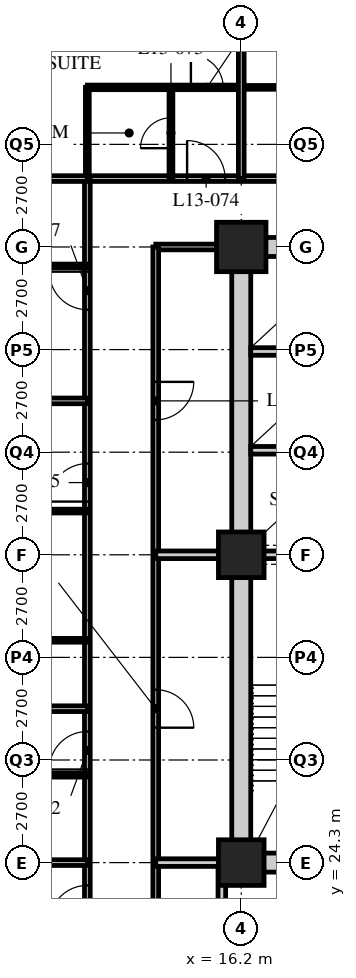
"""IFC4 building model, lengths in metres.
Left out: names, types, materials, properties, quantities, classifications, styles, units other than length and angle.
Written with IfcOpenShell. Run it as: python <this file> out.ifc"""

import sys

from ifc_helpers import new_model, si_unit, direction, frame, frame_2d, origin, origin_2d, place, context, subcontext, project, spatial, rectangle, hollow_rectangle, extrude, element, fill, save


model = new_model("IFC4")
c1 = context("Model", 3, precision=1e-05, world=origin(), true_north=direction((0.0, 1.0)))
c2 = subcontext(c1, "Body", "Model", "MODEL_VIEW")
j1 = project(units=[si_unit("LENGTHUNIT", "METRE"), si_unit("PLANEANGLEUNIT", "RADIAN")], contexts=[c1])
p1 = place(None, origin())
s1 = spatial("IfcSite", under=j1, at=p1, CompositionType="ELEMENT")
p2 = place(p1, origin())
s2 = spatial("IfcBuilding", under=s1, at=p2, CompositionType="ELEMENT")
p3 = place(p2, frame((0.0, 0.0, 56.8)))
s3 = spatial("IfcBuildingStorey", under=s2, at=p3, CompositionType="ELEMENT", Elevation=56.8)
for number, where, z_axis, x_axis in (
    (1, (16.2, 24.3, 0.0), (0.0, 0.0, 1.0), (1.0, 0.0, 0.0)),
    (2, (16.2, 32.4, 0.0), (0.0, 0.0, 1.0), (1.0, 0.0, 0.0)),
):
    element("IfcColumn", number, at=place(p3, frame(where, z_axis=z_axis, x_axis=x_axis)), inside=s3, PredefinedType="COLUMN", context=c2, shape_type="SweptSolid", body=[
        extrude(hollow_rectangle(XDim=1.2, YDim=1.2, WallThickness=0.12, at=origin_2d()), origin(), (0.0, 0.0, 1.0), 3.4),
    ])
p4 = place(p3, frame((16.2, 40.5, 0.0), z_axis=(0.0, 0.0, 1.0), x_axis=(1.0, 0.0, 0.0)))
e3 = element("IfcColumn", 3, at=p4, inside=s3, PredefinedType="COLUMN", context=c2, shape_type="SweptSolid", body=[
    extrude(hollow_rectangle(XDim=1.3, YDim=1.3, WallThickness=0.13, at=origin_2d()), origin(), (0.0, 0.0, 1.0), 3.4),
])
p5 = place(p3, frame((12.15, 42.3, 0.0), z_axis=(0.0, 0.0, 1.0), x_axis=(1.0, 0.0, 0.0)))
e4 = element("IfcWall", 4, at=p5, inside=s3, PredefinedType="PARTITIONING", context=c2, shape_type="SweptSolid", body=[
    extrude(rectangle(XDim=32.4, YDim=0.15, at=frame_2d((16.2, 0.0))), origin(), (0.0, 0.0, 1.0), 3.19),
])
p6 = place(p5, frame((6.5, 0.0, 0.0)))
e5 = element("IfcOpeningElement", 5, at=p6, cuts=e4, PredefinedType="OPENING", context=c2, shape_type="SweptSolid", body=[
    extrude(rectangle(XDim=1.0, YDim=2.1, at=frame_2d((0.5, 1.05))), frame((0.0, 0.085, 0.0), z_axis=(0.0, -1.0, 0.0), x_axis=(1.0, 0.0, 0.0)), (0.0, 0.0, 1.0), 0.17),
])
p7 = place(p5, frame((10.55, 0.0, 0.0)))
e6 = element("IfcOpeningElement", 6, at=p7, cuts=e4, PredefinedType="OPENING", context=c2, shape_type="SweptSolid", body=[
    extrude(rectangle(XDim=1.0, YDim=2.1, at=frame_2d((0.5, 1.05))), frame((0.0, 0.085, 0.0), z_axis=(0.0, -1.0, 0.0), x_axis=(1.0, 0.0, 0.0)), (0.0, 0.0, 1.0), 0.17),
])
p8 = place(p5, frame((14.6, 0.0, 0.0)))
e7 = element("IfcOpeningElement", 7, at=p8, cuts=e4, PredefinedType="OPENING", context=c2, shape_type="SweptSolid", body=[
    extrude(rectangle(XDim=1.0, YDim=2.1, at=frame_2d((0.5, 1.05))), frame((0.0, 0.085, 0.0), z_axis=(0.0, -1.0, 0.0), x_axis=(1.0, 0.0, 0.0)), (0.0, 0.0, 1.0), 0.17),
])
p9 = place(p5, frame((18.65, 0.0, 0.0)))
e8 = element("IfcOpeningElement", 8, at=p9, cuts=e4, PredefinedType="OPENING", context=c2, shape_type="SweptSolid", body=[
    extrude(rectangle(XDim=1.0, YDim=2.1, at=frame_2d((0.5, 1.05))), frame((0.0, 0.085, 0.0), z_axis=(0.0, -1.0, 0.0), x_axis=(1.0, 0.0, 0.0)), (0.0, 0.0, 1.0), 0.17),
])
p10 = place(p5, frame((22.7, 0.0, 0.0)))
e9 = element("IfcOpeningElement", 9, at=p10, cuts=e4, PredefinedType="OPENING", context=c2, shape_type="SweptSolid", body=[
    extrude(rectangle(XDim=1.0, YDim=2.1, at=frame_2d((0.5, 1.05))), frame((0.0, 0.085, 0.0), z_axis=(0.0, -1.0, 0.0), x_axis=(1.0, 0.0, 0.0)), (0.0, 0.0, 1.0), 0.17),
])
p11 = place(p5, frame((26.75, 0.0, 0.0)))
e10 = element("IfcOpeningElement", 10, at=p11, cuts=e4, PredefinedType="OPENING", context=c2, shape_type="SweptSolid", body=[
    extrude(rectangle(XDim=1.0, YDim=2.1, at=frame_2d((0.5, 1.05))), frame((0.0, 0.085, 0.0), z_axis=(0.0, -1.0, 0.0), x_axis=(1.0, 0.0, 0.0)), (0.0, 0.0, 1.0), 0.17),
])
p12 = place(p5, frame((28.775, 0.0, 0.0)))
e11 = element("IfcOpeningElement", 11, at=p12, cuts=e4, PredefinedType="OPENING", context=c2, shape_type="SweptSolid", body=[
    extrude(rectangle(XDim=1.0, YDim=2.1, at=frame_2d((0.5, 1.05))), frame((0.0, 0.085, 0.0), z_axis=(0.0, -1.0, 0.0), x_axis=(1.0, 0.0, 0.0)), (0.0, 0.0, 1.0), 0.17),
])
p13 = place(p5, frame((2.625, 0.0, 0.0)))
e12 = element("IfcOpeningElement", 12, at=p13, cuts=e4, PredefinedType="OPENING", context=c2, shape_type="SweptSolid", body=[
    extrude(rectangle(XDim=1.0, YDim=2.1, at=frame_2d((0.5, 1.05))), frame((0.0, 0.085, 0.0), z_axis=(0.0, -1.0, 0.0), x_axis=(1.0, 0.0, 0.0)), (0.0, 0.0, 1.0), 0.17),
])
p14 = place(p3, frame((12.15, 12.15, 0.0), z_axis=(0.0, 0.0, 1.0), x_axis=(0.0, 1.0, 0.0)))
e13 = element("IfcWall", 13, at=p14, inside=s3, PredefinedType="PARTITIONING", context=c2, shape_type="SweptSolid", body=[
    extrude(rectangle(XDim=30.15, YDim=0.15, at=frame_2d((15.075, 0.0))), origin(), (0.0, 0.0, 1.0), 3.19),
])
p15 = place(p14, frame((2.45, 0.0, 0.0)))
e14 = element("IfcOpeningElement", 14, at=p15, cuts=e13, PredefinedType="OPENING", context=c2, shape_type="SweptSolid", body=[
    extrude(rectangle(XDim=1.0, YDim=2.1, at=frame_2d((0.5, 1.05))), frame((0.0, 0.085, 0.0), z_axis=(0.0, -1.0, 0.0), x_axis=(1.0, 0.0, 0.0)), (0.0, 0.0, 1.0), 0.17),
])
p16 = place(p14, frame((6.5, 0.0, 0.0)))
e15 = element("IfcOpeningElement", 15, at=p16, cuts=e13, PredefinedType="OPENING", context=c2, shape_type="SweptSolid", body=[
    extrude(rectangle(XDim=1.0, YDim=2.1, at=frame_2d((0.5, 1.05))), frame((0.0, 0.085, 0.0), z_axis=(0.0, -1.0, 0.0), x_axis=(1.0, 0.0, 0.0)), (0.0, 0.0, 1.0), 0.17),
])
p17 = place(p14, frame((10.55, 0.0, 0.0)))
e16 = element("IfcOpeningElement", 16, at=p17, cuts=e13, PredefinedType="OPENING", context=c2, shape_type="SweptSolid", body=[
    extrude(rectangle(XDim=1.0, YDim=2.1, at=frame_2d((0.5, 1.05))), frame((0.0, 0.085, 0.0), z_axis=(0.0, -1.0, 0.0), x_axis=(1.0, 0.0, 0.0)), (0.0, 0.0, 1.0), 0.17),
])
p18 = place(p14, frame((14.6, 0.0, 0.0)))
e17 = element("IfcOpeningElement", 17, at=p18, cuts=e13, PredefinedType="OPENING", context=c2, shape_type="SweptSolid", body=[
    extrude(rectangle(XDim=1.0, YDim=2.1, at=frame_2d((0.5, 1.05))), frame((0.0, 0.085, 0.0), z_axis=(0.0, -1.0, 0.0), x_axis=(1.0, 0.0, 0.0)), (0.0, 0.0, 1.0), 0.17),
])
p19 = place(p14, frame((21.65, 0.0, 0.0)))
e18 = element("IfcOpeningElement", 18, at=p19, cuts=e13, PredefinedType="OPENING", context=c2, shape_type="SweptSolid", body=[
    extrude(rectangle(XDim=1.0, YDim=2.1, at=frame_2d((0.5, 1.05))), frame((0.0, 0.085, 0.0), z_axis=(0.0, -1.0, 0.0), x_axis=(1.0, 0.0, 0.0)), (0.0, 0.0, 1.0), 0.17),
])
p20 = place(p14, frame((26.7, 0.0, 0.0)))
e19 = element("IfcOpeningElement", 19, at=p20, cuts=e13, PredefinedType="OPENING", context=c2, shape_type="SweptSolid", body=[
    extrude(rectangle(XDim=1.0, YDim=2.1, at=frame_2d((0.5, 1.05))), frame((0.0, 0.085, 0.0), z_axis=(0.0, -1.0, 0.0), x_axis=(1.0, 0.0, 0.0)), (0.0, 0.0, 1.0), 0.17),
])
p21 = place(p3, frame((16.0, 40.5, 0.0), z_axis=(0.0, 0.0, 1.0), x_axis=(-1.0, 0.0, 0.0)))
e20 = element("IfcWall", 20, at=p21, inside=s3, PredefinedType="PARTITIONING", context=c2, shape_type="SweptSolid", body=[
    extrude(rectangle(XDim=2.05, YDim=0.15, at=frame_2d((1.025, 0.0))), origin(), (0.0, 0.0, 1.0), 2.578),
])
p22 = place(p3, frame((13.95, 40.5, 0.0), z_axis=(0.0, 0.0, 1.0), x_axis=(0.0, -1.0, 0.0)))
e21 = element("IfcWall", 21, at=p22, inside=s3, PredefinedType="PARTITIONING", context=c2, shape_type="SweptSolid", body=[
    extrude(rectangle(XDim=26.55, YDim=0.15, at=frame_2d((13.275, 0.0))), origin(), (0.0, 0.0, 1.0), 3.19),
])
p23 = place(p22, frame((11.65, 0.0, 0.0)))
e22 = element("IfcOpeningElement", 22, at=p23, cuts=e21, PredefinedType="OPENING", context=c2, shape_type="SweptSolid", body=[
    extrude(rectangle(XDim=1.0, YDim=2.1, at=frame_2d((0.5, 1.05))), frame((0.0, 0.085, 0.0), z_axis=(0.0, -1.0, 0.0), x_axis=(1.0, 0.0, 0.0)), (0.0, 0.0, 1.0), 0.17),
])
p24 = place(p22, frame((3.55, 0.0, 0.0)))
e23 = element("IfcOpeningElement", 23, at=p24, cuts=e21, PredefinedType="OPENING", context=c2, shape_type="SweptSolid", body=[
    extrude(rectangle(XDim=1.0, YDim=2.1, at=frame_2d((0.5, 1.05))), frame((0.0, 0.085, 0.0), z_axis=(0.0, -1.0, 0.0), x_axis=(1.0, 0.0, 0.0)), (0.0, 0.0, 1.0), 0.17),
])
p25 = place(p3, frame((13.95, 32.4, 0.0), z_axis=(0.0, 0.0, 1.0), x_axis=(1.0, 0.0, 0.0)))
e24 = element("IfcWall", 24, at=p25, inside=s3, PredefinedType="SOLIDWALL", context=c2, shape_type="SweptSolid", body=[
    extrude(rectangle(XDim=2.25, YDim=0.2, at=frame_2d((1.125, 0.0))), origin(), (0.0, 0.0, 1.0), 2.578),
])
p26 = place(p3, frame((15.689, 13.95, 0.0), z_axis=(0.0, 0.0, 1.0), x_axis=(0.0, 1.0, 0.0)))
e25 = element("IfcWall", 25, at=p26, inside=s3, PredefinedType="SOLIDWALL", context=c2, shape_type="SweptSolid", body=[
    extrude(rectangle(XDim=10.35, YDim=0.2, at=frame_2d((5.175, 0.0))), origin(), (0.0, 0.0, 1.0), 3.19),
])
p27 = place(p3, frame((13.95, 24.3, 0.0), z_axis=(0.0, 0.0, 1.0), x_axis=(1.0, 0.0, 0.0)))
e26 = element("IfcWall", 26, at=p27, inside=s3, PredefinedType="SOLIDWALL", context=c2, shape_type="SweptSolid", body=[
    extrude(rectangle(XDim=2.25, YDim=0.2, at=frame_2d((1.125, 0.0))), origin(), (0.0, 0.0, 1.0), 2.578),
])
p28 = place(p3, frame((16.2, 44.7, 0.0), z_axis=(0.0, 0.0, 1.0), x_axis=(1.0, 0.0, 0.0)))
e27 = element("IfcWall", 27, at=p28, inside=s3, PredefinedType="PARTITIONING", context=c2, shape_type="SweptSolid", body=[
    extrude(rectangle(XDim=2.3, YDim=0.1, at=frame_2d((1.15, 0.0))), origin(), (0.0, 0.0, 1.0), 3.19),
])
p29 = place(p3, frame((12.15, 24.3, 0.0), z_axis=(0.0, 0.0, 1.0), x_axis=(-1.0, 0.0, 0.0)))
e28 = element("IfcWall", 28, at=p29, inside=s3, PredefinedType="PARTITIONING", context=c2, shape_type="SweptSolid", body=[
    extrude(rectangle(XDim=11.85, YDim=0.15, at=frame_2d((5.925, 0.0))), origin(), (0.0, 0.0, 1.0), 2.578),
])
p30 = place(p3, frame((12.15, 26.6, 0.0), z_axis=(0.0, 0.0, 1.0), x_axis=(-1.0, 0.0, 0.0)))
e29 = element("IfcWall", 29, at=p30, inside=s3, PredefinedType="PARTITIONING", context=c2, shape_type="SweptSolid", body=[
    extrude(rectangle(XDim=3.0, YDim=0.1, at=frame_2d((1.5, 0.0))), origin(), (0.0, 0.0, 1.0), 3.19),
])
p31 = place(p30, frame((1.95, 0.0, 0.0)))
e30 = element("IfcOpeningElement", 30, at=p31, cuts=e29, PredefinedType="OPENING", context=c2, shape_type="SweptSolid", body=[
    extrude(rectangle(XDim=0.8, YDim=2.1, at=frame_2d((0.4, 1.05))), frame((0.0, 0.06, 0.0), z_axis=(0.0, -1.0, 0.0), x_axis=(1.0, 0.0, 0.0)), (0.0, 0.0, 1.0), 0.12),
])
p32 = place(p3, frame((12.15, 28.35, 0.0), z_axis=(0.0, 0.0, 1.0), x_axis=(-1.0, 0.0, 0.0)))
e31 = element("IfcWall", 31, at=p32, inside=s3, PredefinedType="PARTITIONING", context=c2, shape_type="SweptSolid", body=[
    extrude(rectangle(XDim=11.85, YDim=0.15, at=frame_2d((5.925, 0.0))), origin(), (0.0, 0.0, 1.0), 3.19),
])
for number, where, z_axis, x_axis in (
    (32, (12.15, 30.15, 0.0), (0.0, 0.0, 1.0), (-1.0, 0.0, 0.0)),
    (33, (12.15, 33.55, 0.0), (0.0, 0.0, 1.0), (-1.0, 0.0, 0.0)),
):
    element("IfcWall", number, at=place(p3, frame(where, z_axis=z_axis, x_axis=x_axis)), inside=s3, PredefinedType="PARTITIONING", context=c2, shape_type="SweptSolid", body=[
        extrude(rectangle(XDim=3.515, YDim=0.1, at=frame_2d((1.757, 0.0))), origin(), (0.0, 0.0, 1.0), 3.19),
    ])
p33 = place(p3, frame((12.15, 36.45, 0.0), z_axis=(0.0, 0.0, 1.0), x_axis=(-1.0, 0.0, 0.0)))
e34 = element("IfcWall", 34, at=p33, inside=s3, PredefinedType="PARTITIONING", context=c2, shape_type="SweptSolid", body=[
    extrude(rectangle(XDim=11.85, YDim=0.15, at=frame_2d((5.925, 0.0))), origin(), (0.0, 0.0, 1.0), 3.19),
])
p34 = place(p3, frame((12.15, 40.0, 0.0), z_axis=(0.0, 0.0, 1.0), x_axis=(-1.0, 0.0, 0.0)))
e35 = element("IfcWall", 35, at=p34, inside=s3, PredefinedType="PARTITIONING", context=c2, shape_type="SweptSolid", body=[
    extrude(rectangle(XDim=3.515, YDim=0.1, at=frame_2d((1.757, 0.0))), origin(), (0.0, 0.0, 1.0), 3.19),
])
p35 = place(p34, frame((1.965, 0.0, 0.0)))
e36 = element("IfcOpeningElement", 36, at=p35, cuts=e35, PredefinedType="OPENING", context=c2, shape_type="SweptSolid", body=[
    extrude(rectangle(XDim=0.8, YDim=2.1, at=frame_2d((0.4, 1.05))), frame((0.0, 0.06, 0.0), z_axis=(0.0, -1.0, 0.0), x_axis=(1.0, 0.0, 0.0)), (0.0, 0.0, 1.0), 0.12),
])
p36 = place(p3, frame((12.15, 44.7, 0.0), z_axis=(0.0, 0.0, 1.0), x_axis=(1.0, 0.0, 0.0)))
e37 = element("IfcWall", 37, at=p36, inside=s3, PredefinedType="PARTITIONING", context=c2, shape_type="SweptSolid", body=[
    extrude(rectangle(XDim=4.05, YDim=0.12, at=frame_2d((2.025, 0.0))), origin(), (0.0, 0.0, 1.0), 3.19),
])
p37 = place(p36, frame((2.725, 0.0, 0.0)))
e38 = element("IfcOpeningElement", 38, at=p37, cuts=e37, PredefinedType="OPENING", context=c2, shape_type="SweptSolid", body=[
    extrude(rectangle(XDim=0.85, YDim=2.1, at=frame_2d((0.425, 1.05))), frame((0.0, 0.07, 0.0), z_axis=(0.0, -1.0, 0.0), x_axis=(1.0, 0.0, 0.0)), (0.0, 0.0, 1.0), 0.14),
])
p38 = place(p3, frame((14.35, 42.3, 0.0), z_axis=(0.0, 0.0, 1.0), x_axis=(0.0, 1.0, 0.0)))
e39 = element("IfcWall", 39, at=p38, inside=s3, PredefinedType="PARTITIONING", context=c2, shape_type="SweptSolid", body=[
    extrude(rectangle(XDim=2.4, YDim=0.1, at=frame_2d((1.2, 0.0))), origin(), (0.0, 0.0, 1.0), 3.19),
])
p39 = place(p38, frame((0.8, 0.0, 0.0)))
e40 = element("IfcOpeningElement", 40, at=p39, cuts=e39, PredefinedType="OPENING", context=c2, shape_type="SweptSolid", body=[
    extrude(rectangle(XDim=0.8, YDim=2.1, at=frame_2d((0.4, 1.05))), frame((0.0, 0.06, 0.0), z_axis=(0.0, -1.0, 0.0), x_axis=(1.0, 0.0, 0.0)), (0.0, 0.0, 1.0), 0.12),
])
p40 = place(p3, frame((12.15, 42.3, 0.0), z_axis=(0.0, 0.0, 1.0), x_axis=(0.0, 1.0, 0.0)))
e41 = element("IfcWall", 41, at=p40, inside=s3, PredefinedType="PARTITIONING", context=c2, shape_type="SweptSolid", body=[
    extrude(rectangle(XDim=2.4, YDim=0.1, at=frame_2d((1.2, 0.0))), origin(), (0.0, 0.0, 1.0), 3.19),
])
p41 = place(p3, frame((4.35, 42.3, 0.0), z_axis=(0.0, 0.0, 1.0), x_axis=(1.0, 0.0, 0.0)))
e42 = element("IfcWall", 42, at=p41, inside=s3, PredefinedType="PARTITIONING", context=c2, shape_type="SweptSolid", body=[
    extrude(rectangle(XDim=7.8, YDim=0.15, at=frame_2d((3.9, 0.0))), origin(), (0.0, 0.0, 1.0), 3.19),
])
p42 = place(p3, frame((16.2, 42.3, 0.0), z_axis=(0.0, 0.0, 1.0), x_axis=(0.0, 1.0, 0.0)))
e43 = element("IfcWall", 43, at=p42, inside=s3, PredefinedType="PARTITIONING", context=c2, shape_type="SweptSolid", body=[
    extrude(rectangle(XDim=6.0, YDim=0.15, at=frame_2d((3.0, 0.0))), origin(), (0.0, 0.0, 1.0), 2.578),
])
p43 = place(p3, frame((15.95, 24.3, 0.0), z_axis=(0.0, 0.0, 1.0), x_axis=(1.0, 0.0, 0.0)))
e44 = element("IfcWall", 44, at=p43, inside=s3, PredefinedType="SOLIDWALL", context=c2, shape_type="SweptSolid", body=[
    extrude(rectangle(XDim=24.8, YDim=0.5, at=frame_2d((12.4, 0.0))), origin(), (0.0, 0.0, 1.0), 2.54),
])
p44 = place(p43, frame((11.5, 0.0, 0.0)))
e45 = element("IfcOpeningElement", 45, at=p44, cuts=e44, PredefinedType="OPENING", context=c2, shape_type="SweptSolid", body=[
    extrude(rectangle(XDim=1.8, YDim=2.4, at=frame_2d((0.9, 1.2))), frame((0.0, 0.26, 0.0), z_axis=(0.0, -1.0, 0.0), x_axis=(1.0, 0.0, 0.0)), (0.0, 0.0, 1.0), 0.52),
])
p45 = place(p3, frame((15.95, 40.5, 0.0), z_axis=(0.0, 0.0, 1.0), x_axis=(1.0, 0.0, 0.0)))
e46 = element("IfcWall", 46, at=p45, inside=s3, PredefinedType="SOLIDWALL", context=c2, shape_type="SweptSolid", body=[
    extrude(rectangle(XDim=24.8, YDim=0.5, at=frame_2d((12.4, 0.0))), origin(), (0.0, 0.0, 1.0), 2.54),
])
p46 = place(p45, frame((11.5, 0.0, 0.0)))
e47 = element("IfcOpeningElement", 47, at=p46, cuts=e46, PredefinedType="OPENING", context=c2, shape_type="SweptSolid", body=[
    extrude(rectangle(XDim=1.8, YDim=2.4, at=frame_2d((0.9, 1.2))), frame((0.0, 0.26, 0.0), z_axis=(0.0, -1.0, 0.0), x_axis=(1.0, 0.0, 0.0)), (0.0, 0.0, 1.0), 0.52),
])
p47 = place(p3, frame((16.2, 24.55, 0.0), z_axis=(0.0, 0.0, 1.0), x_axis=(0.0, 1.0, 0.0)))
e48 = element("IfcWall", 48, at=p47, inside=s3, PredefinedType="SOLIDWALL", context=c2, shape_type="SweptSolid", body=[
    extrude(rectangle(XDim=15.7, YDim=0.5, at=frame_2d((7.85, 0.0))), origin(), (0.0, 0.0, 1.0), 2.578),
])
p48 = place(p3, frame((16.45, 32.4, 0.0), z_axis=(0.0, 0.0, 1.0), x_axis=(1.0, 0.0, 0.0)))
e49 = element("IfcWall", 49, at=p48, inside=s3, PredefinedType="SOLIDWALL", context=c2, shape_type="SweptSolid", body=[
    extrude(rectangle(XDim=7.95, YDim=0.2, at=frame_2d((3.975, 0.0))), origin(), (0.0, 0.0, 1.0), 2.578),
])
for number, where, z_axis, x_axis in (
    (50, (16.45, 35.15, 0.0), (0.0, 0.0, 1.0), (1.0, 0.0, 0.0)),
    (51, (16.45, 37.75, 0.0), (0.0, 0.0, 1.0), (1.0, 0.0, 0.0)),
):
    element("IfcWall", number, at=place(p3, frame(where, z_axis=z_axis, x_axis=x_axis)), inside=s3, PredefinedType="SOLIDWALL", context=c2, shape_type="SweptSolid", body=[
        extrude(rectangle(XDim=2.6, YDim=0.2, at=frame_2d((1.3, 0.0))), origin(), (0.0, 0.0, 1.0), 3.19),
    ])
p49 = place(p23, origin())
e52 = element("IfcDoor", 52, at=p49, inside=s3, OperationType="SINGLE_SWING_RIGHT", PredefinedType="DOOR", context=c2, shape_type="SweptSolid", body=[
    extrude(rectangle(XDim=1.0, YDim=2.1, at=frame_2d((0.5, 1.05))), frame((0.0, 0.025, 0.0), z_axis=(0.0, -1.0, 0.0), x_axis=(1.0, 0.0, 0.0)), (0.0, 0.0, 1.0), 0.05),
])
fill(e22, e52)
p50 = place(p24, origin())
e53 = element("IfcDoor", 53, at=p50, inside=s3, OperationType="SINGLE_SWING_LEFT", PredefinedType="DOOR", context=c2, shape_type="SweptSolid", body=[
    extrude(rectangle(XDim=1.0, YDim=2.1, at=frame_2d((0.5, 1.05))), frame((0.0, 0.025, 0.0), z_axis=(0.0, -1.0, 0.0), x_axis=(1.0, 0.0, 0.0)), (0.0, 0.0, 1.0), 0.05),
])
fill(e23, e53)
p51 = place(p17, origin())
e54 = element("IfcDoor", 54, at=p51, inside=s3, OperationType="SINGLE_SWING_LEFT", PredefinedType="DOOR", context=c2, shape_type="SweptSolid", body=[
    extrude(rectangle(XDim=1.0, YDim=2.1, at=frame_2d((0.5, 1.05))), frame((0.0, 0.025, 0.0), z_axis=(0.0, -1.0, 0.0), x_axis=(1.0, 0.0, 0.0)), (0.0, 0.0, 1.0), 0.05),
])
fill(e16, e54)
p52 = place(p18, origin())
e55 = element("IfcDoor", 55, at=p52, inside=s3, OperationType="SINGLE_SWING_LEFT", PredefinedType="DOOR", context=c2, shape_type="SweptSolid", body=[
    extrude(rectangle(XDim=1.0, YDim=2.1, at=frame_2d((0.5, 1.05))), frame((0.0, 0.025, 0.0), z_axis=(0.0, -1.0, 0.0), x_axis=(1.0, 0.0, 0.0)), (0.0, 0.0, 1.0), 0.05),
])
fill(e17, e55)
p53 = place(p19, origin())
e56 = element("IfcDoor", 56, at=p53, inside=s3, OperationType="SINGLE_SWING_LEFT", PredefinedType="DOOR", context=c2, shape_type="SweptSolid", body=[
    extrude(rectangle(XDim=1.0, YDim=2.1, at=frame_2d((0.5, 1.05))), frame((0.0, 0.025, 0.0), z_axis=(0.0, -1.0, 0.0), x_axis=(1.0, 0.0, 0.0)), (0.0, 0.0, 1.0), 0.05),
])
fill(e18, e56)
p54 = place(p20, origin())
e57 = element("IfcDoor", 57, at=p54, inside=s3, OperationType="SINGLE_SWING_RIGHT", PredefinedType="DOOR", context=c2, shape_type="SweptSolid", body=[
    extrude(rectangle(XDim=1.0, YDim=2.1, at=frame_2d((0.5, 1.05))), frame((0.0, 0.025, 0.0), z_axis=(0.0, -1.0, 0.0), x_axis=(1.0, 0.0, 0.0)), (0.0, 0.0, 1.0), 0.05),
])
fill(e19, e57)
p55 = place(p39, origin())
e58 = element("IfcDoor", 58, at=p55, inside=s3, OperationType="SINGLE_SWING_LEFT", PredefinedType="DOOR", context=c2, shape_type="SweptSolid", body=[
    extrude(rectangle(XDim=0.8, YDim=2.1, at=frame_2d((0.4, 1.05))), frame((0.0, 0.025, 0.0), z_axis=(0.0, -1.0, 0.0), x_axis=(1.0, 0.0, 0.0)), (0.0, 0.0, 1.0), 0.05),
])
fill(e40, e58)
p56 = place(p13, origin())
e59 = element("IfcDoor", 59, at=p56, inside=s3, OperationType="SINGLE_SWING_LEFT", PredefinedType="DOOR", context=c2, shape_type="SweptSolid", body=[
    extrude(rectangle(XDim=1.0, YDim=2.1, at=frame_2d((0.5, 1.05))), frame((0.0, 0.025, 0.0), z_axis=(0.0, -1.0, 0.0), x_axis=(1.0, 0.0, 0.0)), (0.0, 0.0, 1.0), 0.05),
])
fill(e12, e59)
p57 = place(p37, origin())
e60 = element("IfcDoor", 60, at=p57, inside=s3, OperationType="SINGLE_SWING_LEFT", PredefinedType="DOOR", context=c2, shape_type="SweptSolid", body=[
    extrude(rectangle(XDim=0.85, YDim=2.1, at=frame_2d((0.425, 1.05))), frame((0.0, 0.025, 0.0), z_axis=(0.0, -1.0, 0.0), x_axis=(1.0, 0.0, 0.0)), (0.0, 0.0, 1.0), 0.05),
])
fill(e38, e60)
save(model, sys.argv[1])
